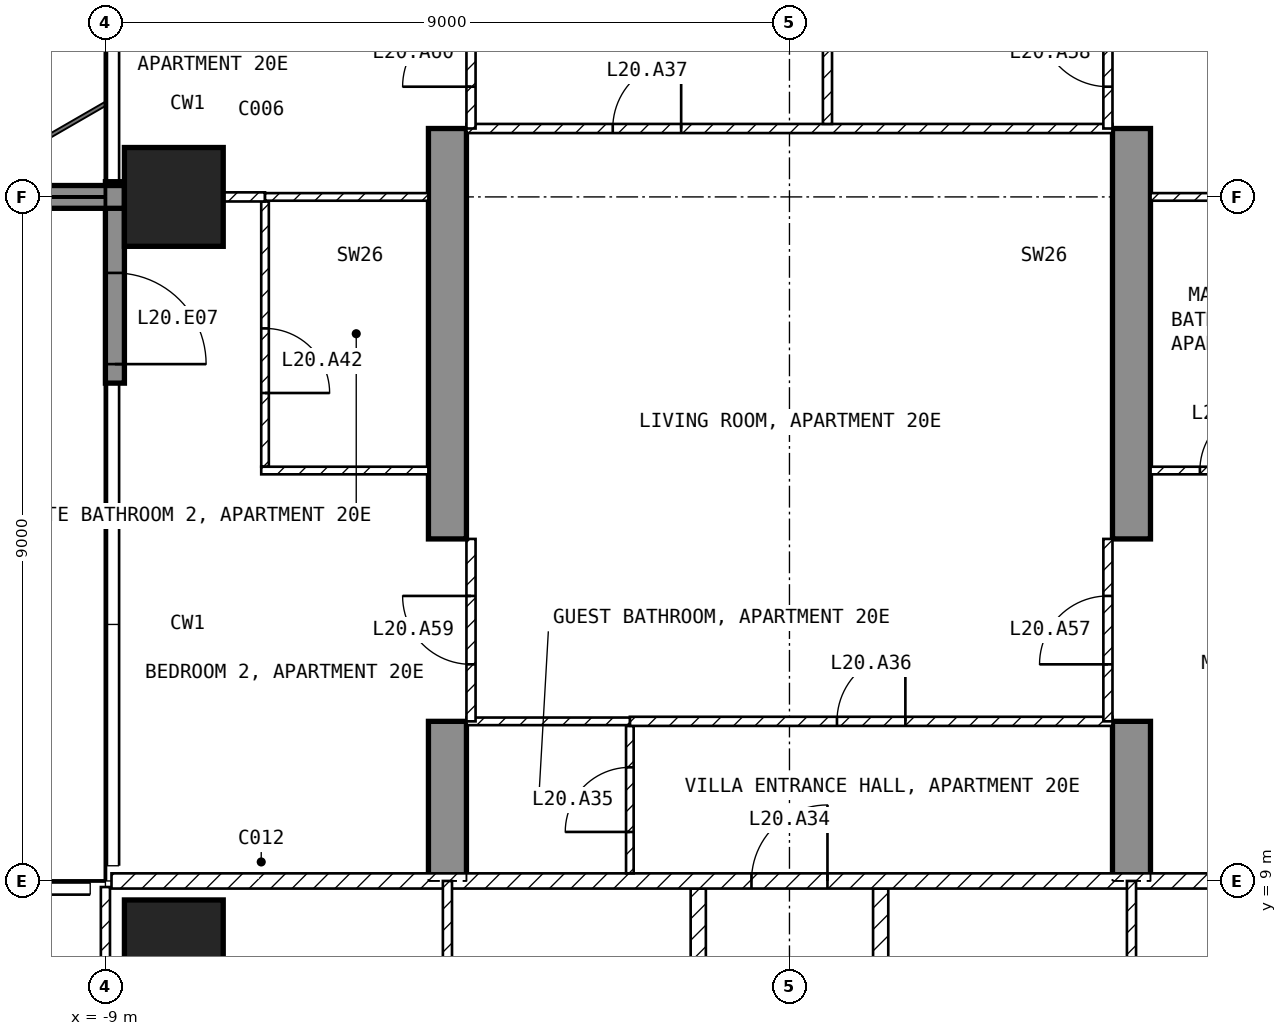
"""IFC4 building model, lengths in metres.
Left out: names, types, materials, properties, quantities, classifications, styles, units other than length and angle.
Written with IfcOpenShell. Run it as: python <this file> out.ifc"""

import sys

from ifc_helpers import new_model, si_unit, direction, frame, frame_2d, origin, origin_2d, place, context, subcontext, project, spatial, polyline, rectangle, outline, extrude, element, fill, save


model = new_model("IFC4")
c1 = context("Model", 3, precision=1e-05, world=origin(), true_north=direction((0.0, 1.0)))
c2 = subcontext(c1, "Body", "Model", "MODEL_VIEW")
j1 = project(units=[si_unit("LENGTHUNIT", "METRE"), si_unit("PLANEANGLEUNIT", "RADIAN")], contexts=[c1])
p1 = place(None, origin())
s1 = spatial("IfcSite", under=j1, at=p1, CompositionType="ELEMENT")
p2 = place(p1, origin())
s2 = spatial("IfcBuilding", under=s1, at=p2, CompositionType="ELEMENT")
p3 = place(p2, frame((0.0, 0.0, 89.0)))
s3 = spatial("IfcBuildingStorey", under=s2, at=p3, CompositionType="ELEMENT", Elevation=89.0)
for number, where, z_axis, x_axis in (
    (1, (-8.1, 8.1, -0.25), (0.0, 0.0, 1.0), (1.0, 0.0, 0.0)),
    (2, (-8.1, 18.0, -0.25), (0.0, 0.0, 1.0), (1.0, 0.0, 0.0)),
):
    element("IfcColumn", number, at=place(p3, frame(where, z_axis=z_axis, x_axis=x_axis)), inside=s3, PredefinedType="COLUMN", context=c2, shape_type="SweptSolid", body=[
        extrude(rectangle(XDim=1.3, YDim=1.3, at=origin_2d()), origin(), (0.0, 0.0, 1.0), 3.45),
    ])
for number, where, z_axis, x_axis in (
    (3, (-4.75, 9.0, -0.25), (1.0, 0.0, 0.0), (0.0, 1.0, 0.0)),
    (4, (4.25, 9.0, -0.25), (1.0, 0.0, 0.0), (0.0, 1.0, 0.0)),
):
    element("IfcWall", number, at=place(p3, frame(where, z_axis=z_axis, x_axis=x_axis)), inside=s3, PredefinedType="SHEAR", context=c2, shape_type="SweptSolid", body=[
        extrude(outline(polyline([(0.0, 0.0), (2.1, 0.0), (2.1, 2.65), (4.5, 2.65), (4.5, 0.0), (9.9, 0.0), (9.9, 2.65), (12.3, 2.65), (12.3, 0.0), (16.45, 0.0), (16.45, 3.45), (0.0, 3.45), (0.0, 0.0)])), origin(), (0.0, 0.0, 1.0), 0.5),
    ])
p4 = place(p3, frame((-8.875, 18.2, 0.0), z_axis=(0.0, 0.0, 1.0), x_axis=(0.0, -1.0, 0.0)))
e5 = element("IfcWall", 5, at=p4, inside=s3, PredefinedType="SOLIDWALL", context=c2, shape_type="SweptSolid", body=[
    extrude(rectangle(XDim=2.65, YDim=0.25, at=frame_2d((1.325, 0.0))), origin(), (0.0, 0.0, 1.0), 3.2),
])
p5 = place(p4, frame((1.2, 0.0, 0.0)))
e6 = element("IfcOpeningElement", 6, at=p5, cuts=e5, PredefinedType="OPENING", context=c2, shape_type="SweptSolid", body=[
    extrude(rectangle(XDim=1.2, YDim=2.4, at=frame_2d((0.6, 1.2))), frame((0.0, 0.135, 0.0), z_axis=(0.0, -1.0, 0.0), x_axis=(1.0, 0.0, 0.0)), (0.0, 0.0, 1.0), 0.27),
])
p6 = place(p3, frame((-8.75, 18.0, 0.0), z_axis=(0.0, 0.0, 1.0), x_axis=(-1.0, 0.0, 0.0)))
e7 = element("IfcWall", 7, at=p6, inside=s3, PredefinedType="SOLIDWALL", context=c2, shape_type="SweptSolid", body=[
    extrude(rectangle(XDim=2.95, YDim=0.3, at=frame_2d((1.475, 0.0))), origin(), (0.0, 0.0, 1.0), 3.2),
])
for number, where, z_axis, x_axis in (
    (8, (1.2, 8.9, 0.0), (0.0, 0.0, 1.0), (0.0, -1.0, 0.0)),
    (9, (-1.2, 1.3, 0.0), (0.0, 0.0, 1.0), (0.0, 1.0, 0.0)),
):
    element("IfcWall", number, at=place(p3, frame(where, z_axis=z_axis, x_axis=x_axis)), inside=s3, PredefinedType="PARTITIONING", context=c2, shape_type="SweptSolid", body=[
        extrude(rectangle(XDim=7.6, YDim=0.2, at=frame_2d((3.8, 0.0))), origin(), (0.0, 0.0, 1.0), 3.2),
    ])
p7 = place(p3, frame((-8.92, 9.0, 0.0), z_axis=(0.0, 0.0, 1.0), x_axis=(1.0, 0.0, 0.0)))
e10 = element("IfcWall", 10, at=p7, inside=s3, PredefinedType="PARTITIONING", context=c2, shape_type="SweptSolid", body=[
    extrude(rectangle(XDim=17.84, YDim=0.2, at=frame_2d((8.92, 0.0))), origin(), (0.0, 0.0, 1.0), 3.2),
])
p8 = place(p7, frame((8.42, 0.0, 0.0)))
e11 = element("IfcOpeningElement", 11, at=p8, cuts=e10, PredefinedType="OPENING", context=c2, shape_type="SweptSolid", body=[
    extrude(rectangle(XDim=1.0, YDim=2.1, at=frame_2d((0.5, 1.05))), frame((0.0, 0.11, 0.0), z_axis=(0.0, -1.0, 0.0), x_axis=(1.0, 0.0, 0.0)), (0.0, 0.0, 1.0), 0.22),
])
p9 = place(p3, frame((4.5, 1.3, 0.0), z_axis=(0.0, 0.0, 1.0), x_axis=(0.0, 1.0, 0.0)))
e12 = element("IfcWall", 12, at=p9, inside=s3, PredefinedType="PARTITIONING", context=c2, shape_type="SweptSolid", body=[
    extrude(rectangle(XDim=7.7, YDim=0.12, at=frame_2d((3.85, 0.0))), origin(), (0.0, 0.0, 1.0), 3.2),
])
p10 = place(p9, frame((4.988, 0.0, 0.0)))
e13 = element("IfcOpeningElement", 13, at=p10, cuts=e12, PredefinedType="OPENING", context=c2, shape_type="SweptSolid", body=[
    extrude(rectangle(XDim=0.9, YDim=2.1, at=frame_2d((0.45, 1.05))), frame((0.0, 0.07, 0.0), z_axis=(0.0, -1.0, 0.0), x_axis=(1.0, 0.0, 0.0)), (0.0, 0.0, 1.0), 0.14),
])
p11 = place(p3, frame((-9.0, 8.92, 0.0), z_axis=(0.0, 0.0, 1.0), x_axis=(0.0, -1.0, 0.0)))
e14 = element("IfcWall", 14, at=p11, inside=s3, PredefinedType="PARTITIONING", context=c2, shape_type="SweptSolid", body=[
    extrude(rectangle(XDim=7.62, YDim=0.12, at=frame_2d((3.81, 0.0))), origin(), (0.0, 0.0, 1.0), 3.2),
])
p12 = place(p11, frame((6.02, 0.0, 0.0)))
e15 = element("IfcOpeningElement", 15, at=p12, cuts=e14, PredefinedType="OPENING", context=c2, shape_type="SweptSolid", body=[
    extrude(rectangle(XDim=0.9, YDim=2.1, at=frame_2d((0.45, 1.05))), frame((0.0, 0.07, 0.0), z_axis=(0.0, -1.0, 0.0), x_axis=(1.0, 0.0, 0.0)), (0.0, 0.0, 1.0), 0.14),
])
p13 = place(p3, frame((-4.5, 9.0, 0.0), z_axis=(0.0, 0.0, 1.0), x_axis=(0.0, -1.0, 0.0)))
e16 = element("IfcWall", 16, at=p13, inside=s3, PredefinedType="PARTITIONING", context=c2, shape_type="SweptSolid", body=[
    extrude(rectangle(XDim=7.7, YDim=0.12, at=frame_2d((3.85, 0.0))), origin(), (0.0, 0.0, 1.0), 3.2),
])
p14 = place(p13, frame((4.96, 0.0, 0.0)))
e17 = element("IfcOpeningElement", 17, at=p14, cuts=e16, PredefinedType="OPENING", context=c2, shape_type="SweptSolid", body=[
    extrude(rectangle(XDim=0.9, YDim=2.1, at=frame_2d((0.45, 1.05))), frame((0.0, 0.07, 0.0), z_axis=(0.0, -1.0, 0.0), x_axis=(1.0, 0.0, 0.0)), (0.0, 0.0, 1.0), 0.14),
])
p15 = place(p3, frame((-2.1, 9.1, 0.0), z_axis=(0.0, 0.0, 1.0), x_axis=(0.0, 1.0, 0.0)))
e18 = element("IfcWall", 18, at=p15, inside=s3, PredefinedType="PARTITIONING", context=c2, shape_type="SweptSolid", body=[
    extrude(rectangle(XDim=1.94, YDim=0.1, at=frame_2d((0.97, 0.0))), origin(), (0.0, 0.0, 1.0), 3.2),
])
p16 = place(p15, frame((0.545, 0.0, 0.0)))
e19 = element("IfcOpeningElement", 19, at=p16, cuts=e18, PredefinedType="OPENING", context=c2, shape_type="SweptSolid", body=[
    extrude(rectangle(XDim=0.85, YDim=2.1, at=frame_2d((0.425, 1.05))), frame((0.0, 0.06, 0.0), z_axis=(0.0, -1.0, 0.0), x_axis=(1.0, 0.0, 0.0)), (0.0, 0.0, 1.0), 0.12),
])
p17 = place(p3, frame((-2.1, 11.1, 0.0), z_axis=(0.0, 0.0, 1.0), x_axis=(1.0, 0.0, 0.0)))
e20 = element("IfcWall", 20, at=p17, inside=s3, PredefinedType="PARTITIONING", context=c2, shape_type="SweptSolid", body=[
    extrude(rectangle(XDim=6.35, YDim=0.12, at=frame_2d((3.175, 0.0))), origin(), (0.0, 0.0, 1.0), 3.2),
])
p18 = place(p17, frame((2.725, 0.0, 0.0)))
e21 = element("IfcOpeningElement", 21, at=p18, cuts=e20, PredefinedType="OPENING", context=c2, shape_type="SweptSolid", body=[
    extrude(rectangle(XDim=0.9, YDim=2.1, at=frame_2d((0.45, 1.05))), frame((0.0, 0.07, 0.0), z_axis=(0.0, -1.0, 0.0), x_axis=(1.0, 0.0, 0.0)), (0.0, 0.0, 1.0), 0.14),
])
p19 = place(p3, frame((-4.25, 11.1, 0.0), z_axis=(0.0, 0.0, 1.0), x_axis=(1.0, 0.0, 0.0)))
e22 = element("IfcWall", 22, at=p19, inside=s3, PredefinedType="PARTITIONING", context=c2, shape_type="SweptSolid", body=[
    extrude(rectangle(XDim=2.15, YDim=0.1, at=frame_2d((1.075, 0.0))), origin(), (0.0, 0.0, 1.0), 3.2),
])
p20 = place(p3, frame((-4.25, 18.9, 0.0), z_axis=(0.0, 0.0, 1.0), x_axis=(1.0, 0.0, 0.0)))
e23 = element("IfcWall", 23, at=p20, inside=s3, PredefinedType="PARTITIONING", context=c2, shape_type="SweptSolid", body=[
    extrude(rectangle(XDim=8.5, YDim=0.12, at=frame_2d((4.25, 0.0))), origin(), (0.0, 0.0, 1.0), 3.2),
])
p21 = place(p20, frame((1.925, 0.0, 0.0)))
e24 = element("IfcOpeningElement", 24, at=p21, cuts=e23, PredefinedType="OPENING", context=c2, shape_type="SweptSolid", body=[
    extrude(rectangle(XDim=0.9, YDim=2.1, at=frame_2d((0.45, 1.05))), frame((0.0, 0.07, 0.0), z_axis=(0.0, -1.0, 0.0), x_axis=(1.0, 0.0, 0.0)), (0.0, 0.0, 1.0), 0.14),
])
p22 = place(p3, frame((0.5, 23.34, 0.0), z_axis=(0.0, 0.0, 1.0), x_axis=(0.0, -1.0, 0.0)))
e25 = element("IfcWall", 25, at=p22, inside=s3, PredefinedType="PARTITIONING", context=c2, shape_type="SweptSolid", body=[
    extrude(rectangle(XDim=4.38, YDim=0.12, at=frame_2d((2.19, 0.0))), origin(), (0.0, 0.0, 1.0), 3.2),
])
p23 = place(p22, frame((1.74, 0.0, 0.0)))
e26 = element("IfcOpeningElement", 26, at=p23, cuts=e25, PredefinedType="OPENING", context=c2, shape_type="SweptSolid", body=[
    extrude(rectangle(XDim=0.9, YDim=2.1, at=frame_2d((0.45, 1.05))), frame((0.0, 0.07, 0.0), z_axis=(0.0, -1.0, 0.0), x_axis=(1.0, 0.0, 0.0)), (0.0, 0.0, 1.0), 0.14),
])
p24 = place(p3, frame((4.75, 14.4, 0.0), z_axis=(0.0, 0.0, 1.0), x_axis=(1.0, 0.0, 0.0)))
e27 = element("IfcWall", 27, at=p24, inside=s3, PredefinedType="PARTITIONING", context=c2, shape_type="SweptSolid", body=[
    extrude(rectangle(XDim=2.2, YDim=0.1, at=frame_2d((1.1, 0.0))), origin(), (0.0, 0.0, 1.0), 3.2),
])
p25 = place(p24, frame((0.65, 0.0, 0.0)))
e28 = element("IfcOpeningElement", 28, at=p25, cuts=e27, PredefinedType="OPENING", context=c2, shape_type="SweptSolid", body=[
    extrude(rectangle(XDim=0.85, YDim=2.1, at=frame_2d((0.425, 1.05))), frame((0.0, 0.06, 0.0), z_axis=(0.0, -1.0, 0.0), x_axis=(1.0, 0.0, 0.0)), (0.0, 0.0, 1.0), 0.12),
])
p26 = place(p3, frame((4.75, 18.0, 0.0), z_axis=(0.0, 0.0, 1.0), x_axis=(1.0, 0.0, 0.0)))
e29 = element("IfcWall", 29, at=p26, inside=s3, PredefinedType="PARTITIONING", context=c2, shape_type="SweptSolid", body=[
    extrude(rectangle(XDim=2.15, YDim=0.1, at=frame_2d((1.075, 0.0))), origin(), (0.0, 0.0, 1.0), 2.296),
])
p27 = place(p3, frame((-6.9, 17.94, 0.0), z_axis=(0.0, 0.0, 1.0), x_axis=(0.0, -1.0, 0.0)))
e30 = element("IfcWall", 30, at=p27, inside=s3, PredefinedType="PARTITIONING", context=c2, shape_type="SweptSolid", body=[
    extrude(rectangle(XDim=3.49, YDim=0.1, at=frame_2d((1.745, 0.0))), origin(), (0.0, 0.0, 1.0), 3.2),
])
p28 = place(p27, frame((1.67, 0.0, 0.0)))
e31 = element("IfcOpeningElement", 31, at=p28, cuts=e30, PredefinedType="OPENING", context=c2, shape_type="SweptSolid", body=[
    extrude(rectangle(XDim=0.85, YDim=2.1, at=frame_2d((0.425, 1.05))), frame((0.0, 0.06, 0.0), z_axis=(0.0, -1.0, 0.0), x_axis=(1.0, 0.0, 0.0)), (0.0, 0.0, 1.0), 0.12),
])
p29 = place(p3, frame((-6.95, 14.4, 0.0), z_axis=(0.0, 0.0, 1.0), x_axis=(1.0, 0.0, 0.0)))
e32 = element("IfcWall", 32, at=p29, inside=s3, PredefinedType="PARTITIONING", context=c2, shape_type="SweptSolid", body=[
    extrude(rectangle(XDim=2.2, YDim=0.1, at=frame_2d((1.1, 0.0))), origin(), (0.0, 0.0, 1.0), 3.2),
])
p30 = place(p3, frame((-7.45, 18.0, 0.0), z_axis=(0.0, 0.0, 1.0), x_axis=(1.0, 0.0, 0.0)))
e33 = element("IfcWall", 33, at=p30, inside=s3, PredefinedType="PARTITIONING", context=c2, shape_type="SweptSolid", body=[
    extrude(rectangle(XDim=0.55, YDim=0.12, at=frame_2d((0.275, 0.0))), origin(), (0.0, 0.0, 1.0), 2.296),
])
p31 = place(p3, frame((-6.9, 18.0, 0.0), z_axis=(0.0, 0.0, 1.0), x_axis=(1.0, 0.0, 0.0)))
e34 = element("IfcWall", 34, at=p31, inside=s3, PredefinedType="PARTITIONING", context=c2, shape_type="SweptSolid", body=[
    extrude(rectangle(XDim=2.15, YDim=0.1, at=frame_2d((1.075, 0.0))), origin(), (0.0, 0.0, 1.0), 2.296),
])
p32 = place(p3, frame((4.19, 11.1, 0.0), z_axis=(0.0, 0.0, 1.0), x_axis=(0.0, 1.0, 0.0)))
e35 = element("IfcWall", 35, at=p32, inside=s3, PredefinedType="PARTITIONING", context=c2, shape_type="SweptSolid", body=[
    extrude(rectangle(XDim=2.4, YDim=0.12, at=frame_2d((1.2, 0.0))), origin(), (0.0, 0.0, 1.0), 2.4),
])
p33 = place(p32, frame((0.75, 0.0, 0.0)))
e36 = element("IfcOpeningElement", 36, at=p33, cuts=e35, PredefinedType="OPENING", context=c2, shape_type="SweptSolid", body=[
    extrude(rectangle(XDim=0.9, YDim=2.1, at=frame_2d((0.45, 1.05))), frame((0.0, 0.07, 0.0), z_axis=(0.0, -1.0, 0.0), x_axis=(1.0, 0.0, 0.0)), (0.0, 0.0, 1.0), 0.14),
])
p34 = place(p3, frame((4.19, 18.9, 0.0), z_axis=(0.0, 0.0, 1.0), x_axis=(0.0, 1.0, 0.0)))
e37 = element("IfcWall", 37, at=p34, inside=s3, PredefinedType="PARTITIONING", context=c2, shape_type="SweptSolid", body=[
    extrude(rectangle(XDim=2.4, YDim=0.12, at=frame_2d((1.2, 0.0))), origin(), (0.0, 0.0, 1.0), 2.4),
])
p35 = place(p34, frame((0.55, 0.0, 0.0)))
e38 = element("IfcOpeningElement", 38, at=p35, cuts=e37, PredefinedType="OPENING", context=c2, shape_type="SweptSolid", body=[
    extrude(rectangle(XDim=0.9, YDim=2.1, at=frame_2d((0.45, 1.05))), frame((0.0, 0.07, 0.0), z_axis=(0.0, -1.0, 0.0), x_axis=(1.0, 0.0, 0.0)), (0.0, 0.0, 1.0), 0.14),
])
p36 = place(p3, frame((-4.19, 11.1, 0.0), z_axis=(0.0, 0.0, 1.0), x_axis=(0.0, 1.0, 0.0)))
e39 = element("IfcWall", 39, at=p36, inside=s3, PredefinedType="PARTITIONING", context=c2, shape_type="SweptSolid", body=[
    extrude(rectangle(XDim=2.4, YDim=0.12, at=frame_2d((1.2, 0.0))), origin(), (0.0, 0.0, 1.0), 2.4),
])
p37 = place(p36, frame((0.75, 0.0, 0.0)))
e40 = element("IfcOpeningElement", 40, at=p37, cuts=e39, PredefinedType="OPENING", context=c2, shape_type="SweptSolid", body=[
    extrude(rectangle(XDim=0.9, YDim=2.1, at=frame_2d((0.45, 1.05))), frame((0.0, 0.07, 0.0), z_axis=(0.0, -1.0, 0.0), x_axis=(1.0, 0.0, 0.0)), (0.0, 0.0, 1.0), 0.14),
])
p38 = place(p3, frame((-4.19, 18.9, 0.0), z_axis=(0.0, 0.0, 1.0), x_axis=(0.0, 1.0, 0.0)))
e41 = element("IfcWall", 41, at=p38, inside=s3, PredefinedType="PARTITIONING", context=c2, shape_type="SweptSolid", body=[
    extrude(rectangle(XDim=2.4, YDim=0.12, at=frame_2d((1.2, 0.0))), origin(), (0.0, 0.0, 1.0), 2.4),
])
p39 = place(p38, frame((0.55, 0.0, 0.0)))
e42 = element("IfcOpeningElement", 42, at=p39, cuts=e41, PredefinedType="OPENING", context=c2, shape_type="SweptSolid", body=[
    extrude(rectangle(XDim=0.9, YDim=2.1, at=frame_2d((0.45, 1.05))), frame((0.0, 0.07, 0.0), z_axis=(0.0, -1.0, 0.0), x_axis=(1.0, 0.0, 0.0)), (0.0, 0.0, 1.0), 0.14),
])
p40 = place(p5, origin())
e43 = element("IfcDoor", 43, at=p40, inside=s3, OperationType="SINGLE_SWING_RIGHT", PredefinedType="DOOR", context=c2, shape_type="SweptSolid", body=[
    extrude(rectangle(XDim=1.2, YDim=2.4, at=frame_2d((0.6, 1.2))), frame((0.0, 0.025, 0.0), z_axis=(0.0, -1.0, 0.0), x_axis=(1.0, 0.0, 0.0)), (0.0, 0.0, 1.0), 0.05),
])
fill(e6, e43)
p41 = place(p8, origin())
e44 = element("IfcDoor", 44, at=p41, inside=s3, OperationType="SINGLE_SWING_RIGHT", PredefinedType="DOOR", context=c2, shape_type="SweptSolid", body=[
    extrude(rectangle(XDim=1.0, YDim=2.1, at=frame_2d((0.5, 1.05))), frame((0.0, 0.025, 0.0), z_axis=(0.0, -1.0, 0.0), x_axis=(1.0, 0.0, 0.0)), (0.0, 0.0, 1.0), 0.05),
])
fill(e11, e44)
p42 = place(p16, origin())
e45 = element("IfcDoor", 45, at=p42, inside=s3, OperationType="SINGLE_SWING_LEFT", PredefinedType="DOOR", context=c2, shape_type="SweptSolid", body=[
    extrude(rectangle(XDim=0.85, YDim=2.1, at=frame_2d((0.425, 1.05))), frame((0.0, 0.025, 0.0), z_axis=(0.0, -1.0, 0.0), x_axis=(1.0, 0.0, 0.0)), (0.0, 0.0, 1.0), 0.05),
])
fill(e19, e45)
p43 = place(p18, origin())
e46 = element("IfcDoor", 46, at=p43, inside=s3, OperationType="SINGLE_SWING_RIGHT", PredefinedType="DOOR", context=c2, shape_type="SweptSolid", body=[
    extrude(rectangle(XDim=0.9, YDim=2.1, at=frame_2d((0.45, 1.05))), frame((0.0, 0.025, 0.0), z_axis=(0.0, -1.0, 0.0), x_axis=(1.0, 0.0, 0.0)), (0.0, 0.0, 1.0), 0.05),
])
fill(e21, e46)
p44 = place(p21, origin())
e47 = element("IfcDoor", 47, at=p44, inside=s3, OperationType="SINGLE_SWING_RIGHT", PredefinedType="DOOR", context=c2, shape_type="SweptSolid", body=[
    extrude(rectangle(XDim=0.9, YDim=2.1, at=frame_2d((0.45, 1.05))), frame((0.0, 0.025, 0.0), z_axis=(0.0, -1.0, 0.0), x_axis=(1.0, 0.0, 0.0)), (0.0, 0.0, 1.0), 0.05),
])
fill(e24, e47)
p45 = place(p25, origin())
e48 = element("IfcDoor", 48, at=p45, inside=s3, OperationType="SINGLE_SWING_RIGHT", PredefinedType="DOOR", context=c2, shape_type="SweptSolid", body=[
    extrude(rectangle(XDim=0.85, YDim=2.1, at=frame_2d((0.425, 1.05))), frame((0.0, 0.025, 0.0), z_axis=(0.0, -1.0, 0.0), x_axis=(1.0, 0.0, 0.0)), (0.0, 0.0, 1.0), 0.05),
])
fill(e28, e48)
p46 = place(p28, origin())
e49 = element("IfcDoor", 49, at=p46, inside=s3, OperationType="SINGLE_SWING_RIGHT", PredefinedType="DOOR", context=c2, shape_type="SweptSolid", body=[
    extrude(rectangle(XDim=0.85, YDim=2.1, at=frame_2d((0.425, 1.05))), frame((0.0, 0.025, 0.0), z_axis=(0.0, -1.0, 0.0), x_axis=(1.0, 0.0, 0.0)), (0.0, 0.0, 1.0), 0.05),
])
fill(e31, e49)
p47 = place(p33, origin())
e50 = element("IfcDoor", 50, at=p47, inside=s3, OperationType="SINGLE_SWING_LEFT", PredefinedType="DOOR", context=c2, shape_type="SweptSolid", body=[
    extrude(rectangle(XDim=0.9, YDim=2.1, at=frame_2d((0.45, 1.05))), frame((0.0, 0.025, 0.0), z_axis=(0.0, -1.0, 0.0), x_axis=(1.0, 0.0, 0.0)), (0.0, 0.0, 1.0), 0.05),
])
fill(e36, e50)
p48 = place(p35, origin())
e51 = element("IfcDoor", 51, at=p48, inside=s3, OperationType="SINGLE_SWING_RIGHT", PredefinedType="DOOR", context=c2, shape_type="SweptSolid", body=[
    extrude(rectangle(XDim=0.9, YDim=2.1, at=frame_2d((0.45, 1.05))), frame((0.0, 0.025, 0.0), z_axis=(0.0, -1.0, 0.0), x_axis=(1.0, 0.0, 0.0)), (0.0, 0.0, 1.0), 0.05),
])
fill(e38, e51)
p49 = place(p37, origin())
e52 = element("IfcDoor", 52, at=p49, inside=s3, OperationType="SINGLE_SWING_RIGHT", PredefinedType="DOOR", context=c2, shape_type="SweptSolid", body=[
    extrude(rectangle(XDim=0.9, YDim=2.1, at=frame_2d((0.45, 1.05))), frame((0.0, 0.025, 0.0), z_axis=(0.0, -1.0, 0.0), x_axis=(1.0, 0.0, 0.0)), (0.0, 0.0, 1.0), 0.05),
])
fill(e40, e52)
p50 = place(p39, origin())
e53 = element("IfcDoor", 53, at=p50, inside=s3, OperationType="SINGLE_SWING_LEFT", PredefinedType="DOOR", context=c2, shape_type="SweptSolid", body=[
    extrude(rectangle(XDim=0.9, YDim=2.1, at=frame_2d((0.45, 1.05))), frame((0.0, 0.025, 0.0), z_axis=(0.0, -1.0, 0.0), x_axis=(1.0, 0.0, 0.0)), (0.0, 0.0, 1.0), 0.05),
])
fill(e42, e53)
save(model, sys.argv[1])
